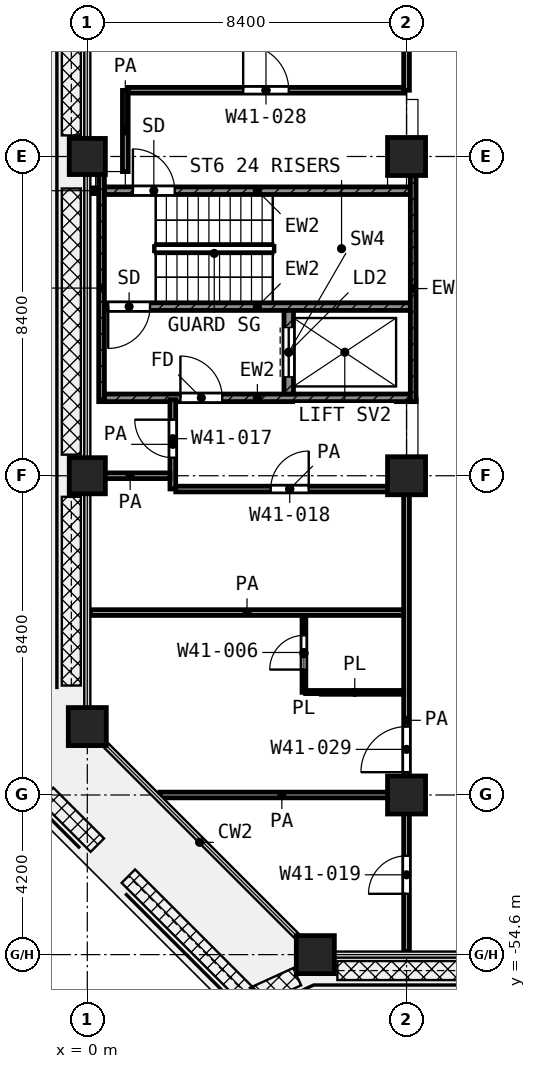
"""IFC4 building model, lengths in metres.
Left out: names, types, materials, properties, quantities, classifications, styles, units other than length and angle.
Written with IfcOpenShell. Run it as: python <this file> out.ifc"""

import sys

from ifc_helpers import new_model, si_unit, direction, frame, frame_2d, origin, origin_2d, place, context, subcontext, project, spatial, rectangle, extrude, element, fill, save


model = new_model("IFC4")
c1 = context("Model", 3, precision=1e-05, world=origin(), true_north=direction((0.0, 1.0)))
c2 = subcontext(c1, "Body", "Model", "MODEL_VIEW")
j1 = project(units=[si_unit("LENGTHUNIT", "METRE"), si_unit("PLANEANGLEUNIT", "RADIAN")], contexts=[c1])
p1 = place(None, origin())
s1 = spatial("IfcSite", under=j1, at=p1, CompositionType="ELEMENT")
p2 = place(p1, origin())
s2 = spatial("IfcBuilding", under=s1, at=p2, CompositionType="ELEMENT")
p3 = place(p2, frame((0.0, 0.0, 179.4)))
s3 = spatial("IfcBuildingStorey", under=s2, at=p3, CompositionType="ELEMENT", Elevation=179.4)
p4 = place(p3, frame((0.0, -33.6, 0.0), z_axis=(0.0, 0.0, 1.0), x_axis=(1.0, 0.0, 0.0)))
e1 = element("IfcColumn", 1, at=p4, inside=s3, PredefinedType="COLUMN", context=c2, shape_type="SweptSolid", body=[
    extrude(rectangle(XDim=0.95, YDim=0.95, at=origin_2d()), origin(), (0.0, 0.0, 1.0), 4.2),
])
p5 = place(p3, frame((8.4, -33.6, 0.0), z_axis=(0.0, 0.0, 1.0), x_axis=(1.0, 0.0, 0.0)))
e2 = element("IfcColumn", 2, at=p5, inside=s3, PredefinedType="COLUMN", context=c2, shape_type="SweptSolid", body=[
    extrude(rectangle(XDim=1.0, YDim=1.0, at=origin_2d()), origin(), (0.0, 0.0, 1.0), 4.2),
])
p6 = place(p3, frame((0.0, -42.0, 0.0), z_axis=(0.0, 0.0, 1.0), x_axis=(1.0, 0.0, 0.0)))
e3 = element("IfcColumn", 3, at=p6, inside=s3, PredefinedType="COLUMN", context=c2, shape_type="SweptSolid", body=[
    extrude(rectangle(XDim=0.95, YDim=0.95, at=origin_2d()), origin(), (0.0, 0.0, 1.0), 4.2),
])
for number, where, z_axis, x_axis in (
    (4, (8.4, -42.0, 0.0), (0.0, 0.0, 1.0), (1.0, 0.0, 0.0)),
    (5, (0.0, -48.6, 0.0), (0.0, 0.0, 1.0), (1.0, 0.0, 0.0)),
    (6, (8.4, -50.4, 0.0), (0.0, 0.0, 1.0), (1.0, 0.0, 0.0)),
    (7, (6.0, -54.6, 0.0), (0.0, 0.0, 1.0), (1.0, 0.0, 0.0)),
):
    element("IfcColumn", number, at=place(p3, frame(where, z_axis=z_axis, x_axis=x_axis)), inside=s3, PredefinedType="COLUMN", context=c2, shape_type="SweptSolid", body=[
        extrude(rectangle(XDim=1.0, YDim=1.0, at=origin_2d()), origin(), (0.0, 0.0, 1.0), 4.2),
    ])
p7 = place(p3, frame((0.375, -40.05, 0.0), z_axis=(0.0, 0.0, 1.0), x_axis=(0.0, 1.0, 0.0)))
e8 = element("IfcWall", 8, at=p7, inside=s3, PredefinedType="SHEAR", context=c2, shape_type="SweptSolid", body=[
    extrude(rectangle(XDim=5.975, YDim=0.15, at=frame_2d((2.988, 0.0))), origin(), (0.0, 0.0, 1.0), 3.6),
])
p8 = place(p3, frame((8.575, -40.05, 0.0), z_axis=(0.0, 0.0, 1.0), x_axis=(0.0, 1.0, 0.0)))
e9 = element("IfcWall", 9, at=p8, inside=s3, PredefinedType="SHEAR", context=c2, shape_type="SweptSolid", body=[
    extrude(rectangle(XDim=5.95, YDim=0.15, at=frame_2d((2.975, 0.0))), origin(), (0.0, 0.0, 1.0), 3.6),
])
p9 = place(p3, frame((0.45, -34.5, 0.0), z_axis=(0.0, 0.0, 1.0), x_axis=(1.0, 0.0, 0.0)))
e10 = element("IfcWall", 10, at=p9, inside=s3, PredefinedType="SHEAR", context=c2, shape_type="SweptSolid", body=[
    extrude(rectangle(XDim=8.05, YDim=0.2, at=frame_2d((4.025, 0.0))), origin(), (0.0, 0.0, 1.0), 3.6),
])
p10 = place(p9, frame((0.75, 0.0, 0.0)))
e11 = element("IfcOpeningElement", 11, at=p10, cuts=e10, PredefinedType="OPENING", context=c2, shape_type="SweptSolid", body=[
    extrude(rectangle(XDim=1.1, YDim=2.1, at=frame_2d((0.55, 1.05))), frame((0.0, 0.11, 0.0), z_axis=(0.0, -1.0, 0.0), x_axis=(1.0, 0.0, 0.0)), (0.0, 0.0, 1.0), 0.22),
])
p11 = place(p3, frame((0.45, -37.55, 0.0), z_axis=(0.0, 0.0, 1.0), x_axis=(1.0, 0.0, 0.0)))
e12 = element("IfcWall", 12, at=p11, inside=s3, PredefinedType="SHEAR", context=c2, shape_type="SweptSolid", body=[
    extrude(rectangle(XDim=8.05, YDim=0.2, at=frame_2d((4.025, 0.0))), origin(), (0.0, 0.0, 1.0), 3.6),
])
p12 = place(p11, frame((0.1, 0.0, 0.0)))
e13 = element("IfcOpeningElement", 13, at=p12, cuts=e12, PredefinedType="OPENING", context=c2, shape_type="SweptSolid", body=[
    extrude(rectangle(XDim=1.1, YDim=2.1, at=frame_2d((0.55, 1.05))), frame((0.0, 0.11, 0.0), z_axis=(0.0, -1.0, 0.0), x_axis=(1.0, 0.0, 0.0)), (0.0, 0.0, 1.0), 0.22),
])
p13 = place(p3, frame((0.45, -39.95, 0.0), z_axis=(0.0, 0.0, 1.0), x_axis=(1.0, 0.0, 0.0)))
e14 = element("IfcWall", 14, at=p13, inside=s3, PredefinedType="SHEAR", context=c2, shape_type="SweptSolid", body=[
    extrude(rectangle(XDim=8.05, YDim=0.2, at=frame_2d((4.025, 0.0))), origin(), (0.0, 0.0, 1.0), 3.6),
])
p14 = place(p13, frame((2.0, 0.0, 0.0)))
e15 = element("IfcOpeningElement", 15, at=p14, cuts=e14, PredefinedType="OPENING", context=c2, shape_type="SweptSolid", body=[
    extrude(rectangle(XDim=1.1, YDim=2.1, at=frame_2d((0.55, 1.05))), frame((0.0, 0.11, 0.0), z_axis=(0.0, -1.0, 0.0), x_axis=(1.0, 0.0, 0.0)), (0.0, 0.0, 1.0), 0.22),
])
p15 = place(p3, frame((5.3, -39.85, 0.0), z_axis=(0.0, 0.0, 1.0), x_axis=(0.0, 1.0, 0.0)))
e16 = element("IfcWall", 16, at=p15, inside=s3, PredefinedType="SHEAR", context=c2, shape_type="SweptSolid", body=[
    extrude(rectangle(XDim=2.2, YDim=0.25, at=frame_2d((1.1, 0.0))), origin(), (0.0, 0.0, 1.0), 3.6),
])
p16 = place(p15, frame((0.45, 0.0, 0.0)))
e17 = element("IfcOpeningElement", 17, at=p16, cuts=e16, PredefinedType="OPENING", context=c2, shape_type="SweptSolid", body=[
    extrude(rectangle(XDim=1.3, YDim=2.1, at=frame_2d((0.65, 1.05))), frame((0.0, 0.135, 0.0), z_axis=(0.0, -1.0, 0.0), x_axis=(1.0, 0.0, 0.0)), (0.0, 0.0, 1.0), 0.27),
])
p17 = place(p3, frame((5.75, -47.7, 0.0), z_axis=(0.0, 0.0, 1.0), x_axis=(1.0, 0.0, 0.0)))
e18 = element("IfcWall", 18, at=p17, inside=s3, PredefinedType="PARTITIONING", context=c2, shape_type="SweptSolid", body=[
    extrude(rectangle(XDim=2.575, YDim=0.1, at=frame_2d((1.288, 0.0))), origin(), (0.0, 0.0, 1.0), 3.6),
])
p18 = place(p3, frame((5.7, -47.7, 0.0), z_axis=(0.0, 0.0, 1.0), x_axis=(0.0, 1.0, 0.0)))
e19 = element("IfcWall", 19, at=p18, inside=s3, PredefinedType="PARTITIONING", context=c2, shape_type="SweptSolid", body=[
    extrude(rectangle(XDim=2.025, YDim=0.1, at=frame_2d((1.012, 0.0))), origin(), (0.0, 0.0, 1.0), 3.6),
])
p19 = place(p18, frame((0.6, 0.0, 0.0)))
e20 = element("IfcOpeningElement", 20, at=p19, cuts=e19, PredefinedType="OPENING", context=c2, shape_type="SweptSolid", body=[
    extrude(rectangle(XDim=0.9, YDim=2.1, at=frame_2d((0.45, 1.05))), frame((0.0, 0.06, 0.0), z_axis=(0.0, -1.0, 0.0), x_axis=(1.0, 0.0, 0.0)), (0.0, 0.0, 1.0), 0.12),
])
p20 = place(p3, frame((1.913, -50.4, 0.0), z_axis=(0.0, 0.0, 1.0), x_axis=(1.0, 0.0, 0.0)))
e21 = element("IfcWall", 21, at=p20, inside=s3, PredefinedType="PARTITIONING", context=c2, shape_type="SweptSolid", body=[
    extrude(rectangle(XDim=6.412, YDim=0.15, at=frame_2d((3.206, 0.0))), origin(), (0.0, 0.0, 1.0), 3.6),
])
p21 = place(p3, frame((0.08, -45.6, 0.0), z_axis=(0.0, 0.0, 1.0), x_axis=(1.0, 0.0, 0.0)))
e22 = element("IfcWall", 22, at=p21, inside=s3, PredefinedType="PARTITIONING", context=c2, shape_type="SweptSolid", body=[
    extrude(rectangle(XDim=8.245, YDim=0.15, at=frame_2d((4.123, 0.0))), origin(), (0.0, 0.0, 1.0), 3.6),
])
p22 = place(p3, frame((2.327, -42.35, 0.0), z_axis=(0.0, 0.0, 1.0), x_axis=(1.0, 0.0, 0.0)))
e23 = element("IfcWall", 23, at=p22, inside=s3, PredefinedType="PARTITIONING", context=c2, shape_type="SweptSolid", body=[
    extrude(rectangle(XDim=5.998, YDim=0.15, at=frame_2d((2.999, 0.0))), origin(), (0.0, 0.0, 1.0), 3.6),
])
p23 = place(p22, frame((2.499, 0.0, 0.0)))
e24 = element("IfcOpeningElement", 24, at=p23, cuts=e23, PredefinedType="OPENING", context=c2, shape_type="SweptSolid", body=[
    extrude(rectangle(XDim=1.0, YDim=2.1, at=frame_2d((0.5, 1.05))), frame((0.0, 0.085, 0.0), z_axis=(0.0, -1.0, 0.0), x_axis=(1.0, 0.0, 0.0)), (0.0, 0.0, 1.0), 0.17),
])
p24 = place(p3, frame((0.08, -42.0, 0.0), z_axis=(0.0, 0.0, 1.0), x_axis=(1.0, 0.0, 0.0)))
e25 = element("IfcWall", 25, at=p24, inside=s3, PredefinedType="PARTITIONING", context=c2, shape_type="SweptSolid", body=[
    extrude(rectangle(XDim=2.095, YDim=0.15, at=frame_2d((1.047, 0.0))), origin(), (0.0, 0.0, 1.0), 3.6),
])
p25 = place(p3, frame((0.08, -34.5, 0.0), z_axis=(0.0, 0.0, 1.0), x_axis=(1.0, 0.0, 0.0)))
e26 = element("IfcWall", 26, at=p25, inside=s3, PredefinedType="PARTITIONING", context=c2, shape_type="SweptSolid", body=[
    extrude(rectangle(XDim=0.19, YDim=0.15, at=frame_2d((0.095, 0.0))), origin(), (0.0, 0.0, 1.0), 3.6),
])
p26 = place(p3, frame((1.077, -31.857, 0.0), z_axis=(0.0, 0.0, 1.0), x_axis=(1.0, 0.0, 0.0)))
e27 = element("IfcWall", 27, at=p26, inside=s3, PredefinedType="PARTITIONING", context=c2, shape_type="SweptSolid", body=[
    extrude(rectangle(XDim=7.248, YDim=0.15, at=frame_2d((3.624, 0.0))), origin(), (0.0, 0.0, 1.0), 3.6),
])
p27 = place(p26, frame((3.024, 0.0, 0.0)))
e28 = element("IfcOpeningElement", 28, at=p27, cuts=e27, PredefinedType="OPENING", context=c2, shape_type="SweptSolid", body=[
    extrude(rectangle(XDim=1.2, YDim=2.1, at=frame_2d((0.6, 1.05))), frame((0.0, 0.085, 0.0), z_axis=(0.0, -1.0, 0.0), x_axis=(1.0, 0.0, 0.0)), (0.0, 0.0, 1.0), 0.17),
])
p28 = place(p3, frame((1.0, -33.997, 0.0), z_axis=(0.0, 0.0, 1.0), x_axis=(0.0, 1.0, 0.0)))
e29 = element("IfcWall", 29, at=p28, inside=s3, PredefinedType="PARTITIONING", context=c2, shape_type="SweptSolid", body=[
    extrude(rectangle(XDim=2.136, YDim=0.15, at=frame_2d((1.068, 0.0))), origin(), (0.0, 0.0, 1.0), 3.6),
])
p29 = place(p3, frame((2.25, -42.348, 0.0), z_axis=(0.0, 0.0, 1.0), x_axis=(0.0, 1.0, 0.0)))
e30 = element("IfcWall", 30, at=p29, inside=s3, PredefinedType="PARTITIONING", context=c2, shape_type="SweptSolid", body=[
    extrude(rectangle(XDim=2.348, YDim=0.15, at=frame_2d((1.174, 0.0))), origin(), (0.0, 0.0, 1.0), 3.6),
])
p30 = place(p29, frame((0.823, 0.0, 0.0)))
e31 = element("IfcOpeningElement", 31, at=p30, cuts=e30, PredefinedType="OPENING", context=c2, shape_type="SweptSolid", body=[
    extrude(rectangle(XDim=1.0, YDim=2.1, at=frame_2d((0.5, 1.05))), frame((0.0, 0.085, 0.0), z_axis=(0.0, -1.0, 0.0), x_axis=(1.0, 0.0, 0.0)), (0.0, 0.0, 1.0), 0.17),
])
p31 = place(p3, frame((8.4, -54.52, 0.0), z_axis=(0.0, 0.0, 1.0), x_axis=(0.0, 1.0, 0.0)))
e32 = element("IfcWall", 32, at=p31, inside=s3, PredefinedType="PARTITIONING", context=c2, shape_type="SweptSolid", body=[
    extrude(rectangle(XDim=12.17, YDim=0.15, at=frame_2d((6.085, 0.0))), origin(), (0.0, 0.0, 1.0), 3.6),
])
p32 = place(p31, frame((4.72, 0.0, 0.0)))
e33 = element("IfcOpeningElement", 33, at=p32, cuts=e32, PredefinedType="OPENING", context=c2, shape_type="SweptSolid", body=[
    extrude(rectangle(XDim=1.2, YDim=2.1, at=frame_2d((0.6, 1.05))), frame((0.0, 0.085, 0.0), z_axis=(0.0, -1.0, 0.0), x_axis=(1.0, 0.0, 0.0)), (0.0, 0.0, 1.0), 0.17),
])
p33 = place(p31, frame((1.52, 0.0, 0.0)))
e34 = element("IfcOpeningElement", 34, at=p33, cuts=e32, PredefinedType="OPENING", context=c2, shape_type="SweptSolid", body=[
    extrude(rectangle(XDim=1.0, YDim=2.1, at=frame_2d((0.5, 1.05))), frame((0.0, 0.085, 0.0), z_axis=(0.0, -1.0, 0.0), x_axis=(1.0, 0.0, 0.0)), (0.0, 0.0, 1.0), 0.17),
])
p34 = place(p3, frame((8.4, -31.857, 0.0), z_axis=(0.0, 0.0, 1.0), x_axis=(0.0, 1.0, 0.0)))
e35 = element("IfcWall", 35, at=p34, inside=s3, PredefinedType="PARTITIONING", context=c2, shape_type="SweptSolid", body=[
    extrude(rectangle(XDim=6.957, YDim=0.15, at=frame_2d((3.479, 0.0))), origin(), (0.0, 0.0, 1.0), 3.6),
])
p35 = place(p10, origin())
e36 = element("IfcDoor", 36, at=p35, inside=s3, OperationType="SINGLE_SWING_LEFT", PredefinedType="DOOR", context=c2, shape_type="SweptSolid", body=[
    extrude(rectangle(XDim=1.1, YDim=2.1, at=frame_2d((0.55, 1.05))), frame((0.0, 0.025, 0.0), z_axis=(0.0, -1.0, 0.0), x_axis=(1.0, 0.0, 0.0)), (0.0, 0.0, 1.0), 0.05),
])
fill(e11, e36)
p36 = place(p12, frame((1.1, 0.0, 0.0), z_axis=(0.0, 0.0, 1.0), x_axis=(-1.0, 0.0, 0.0)))
e37 = element("IfcDoor", 37, at=p36, inside=s3, OperationType="SINGLE_SWING_LEFT", PredefinedType="DOOR", context=c2, shape_type="SweptSolid", body=[
    extrude(rectangle(XDim=1.1, YDim=2.1, at=frame_2d((0.55, 1.05))), frame((0.0, 0.025, 0.0), z_axis=(0.0, -1.0, 0.0), x_axis=(1.0, 0.0, 0.0)), (0.0, 0.0, 1.0), 0.05),
])
fill(e13, e37)
p37 = place(p16, origin())
e38 = element("IfcDoor", 38, at=p37, inside=s3, OperationType="DOUBLE_DOOR_SLIDING", PredefinedType="DOOR", context=c2, shape_type="SweptSolid", body=[
    extrude(rectangle(XDim=1.3, YDim=2.1, at=frame_2d((0.65, 1.05))), frame((0.0, 0.025, 0.0), z_axis=(0.0, -1.0, 0.0), x_axis=(1.0, 0.0, 0.0)), (0.0, 0.0, 1.0), 0.05),
])
fill(e17, e38)
p38 = place(p14, origin())
e39 = element("IfcDoor", 39, at=p38, inside=s3, OperationType="SINGLE_SWING_LEFT", PredefinedType="DOOR", context=c2, shape_type="SweptSolid", body=[
    extrude(rectangle(XDim=1.1, YDim=2.1, at=frame_2d((0.55, 1.05))), frame((0.0, 0.025, 0.0), z_axis=(0.0, -1.0, 0.0), x_axis=(1.0, 0.0, 0.0)), (0.0, 0.0, 1.0), 0.05),
])
fill(e15, e39)
p39 = place(p27, origin())
e40 = element("IfcDoor", 40, at=p39, inside=s3, OperationType="SINGLE_SWING_LEFT", PredefinedType="DOOR", context=c2, shape_type="SweptSolid", body=[
    extrude(rectangle(XDim=1.2, YDim=2.1, at=frame_2d((0.6, 1.05))), frame((0.0, 0.025, 0.0), z_axis=(0.0, -1.0, 0.0), x_axis=(1.0, 0.0, 0.0)), (0.0, 0.0, 1.0), 0.05),
])
fill(e28, e40)
p40 = place(p30, origin())
e41 = element("IfcDoor", 41, at=p40, inside=s3, OperationType="SINGLE_SWING_RIGHT", PredefinedType="DOOR", context=c2, shape_type="SweptSolid", body=[
    extrude(rectangle(XDim=1.0, YDim=2.1, at=frame_2d((0.5, 1.05))), frame((0.0, 0.025, 0.0), z_axis=(0.0, -1.0, 0.0), x_axis=(1.0, 0.0, 0.0)), (0.0, 0.0, 1.0), 0.05),
])
fill(e31, e41)
p41 = place(p23, origin())
e42 = element("IfcDoor", 42, at=p41, inside=s3, OperationType="SINGLE_SWING_RIGHT", PredefinedType="DOOR", context=c2, shape_type="SweptSolid", body=[
    extrude(rectangle(XDim=1.0, YDim=2.1, at=frame_2d((0.5, 1.05))), frame((0.0, 0.025, 0.0), z_axis=(0.0, -1.0, 0.0), x_axis=(1.0, 0.0, 0.0)), (0.0, 0.0, 1.0), 0.05),
])
fill(e24, e42)
p42 = place(p32, origin())
e43 = element("IfcDoor", 43, at=p42, inside=s3, OperationType="SINGLE_SWING_LEFT", PredefinedType="DOOR", context=c2, shape_type="SweptSolid", body=[
    extrude(rectangle(XDim=1.2, YDim=2.1, at=frame_2d((0.6, 1.05))), frame((0.0, 0.025, 0.0), z_axis=(0.0, -1.0, 0.0), x_axis=(1.0, 0.0, 0.0)), (0.0, 0.0, 1.0), 0.05),
])
fill(e33, e43)
p43 = place(p19, origin())
e44 = element("IfcDoor", 44, at=p43, inside=s3, OperationType="SINGLE_SWING_LEFT", PredefinedType="DOOR", context=c2, shape_type="SweptSolid", body=[
    extrude(rectangle(XDim=0.9, YDim=2.1, at=frame_2d((0.45, 1.05))), frame((0.0, 0.025, 0.0), z_axis=(0.0, -1.0, 0.0), x_axis=(1.0, 0.0, 0.0)), (0.0, 0.0, 1.0), 0.05),
])
fill(e20, e44)
p44 = place(p33, origin())
e45 = element("IfcDoor", 45, at=p44, inside=s3, OperationType="SINGLE_SWING_LEFT", PredefinedType="DOOR", context=c2, shape_type="SweptSolid", body=[
    extrude(rectangle(XDim=1.0, YDim=2.1, at=frame_2d((0.5, 1.05))), frame((0.0, 0.025, 0.0), z_axis=(0.0, -1.0, 0.0), x_axis=(1.0, 0.0, 0.0)), (0.0, 0.0, 1.0), 0.05),
])
fill(e34, e45)
save(model, sys.argv[1])
